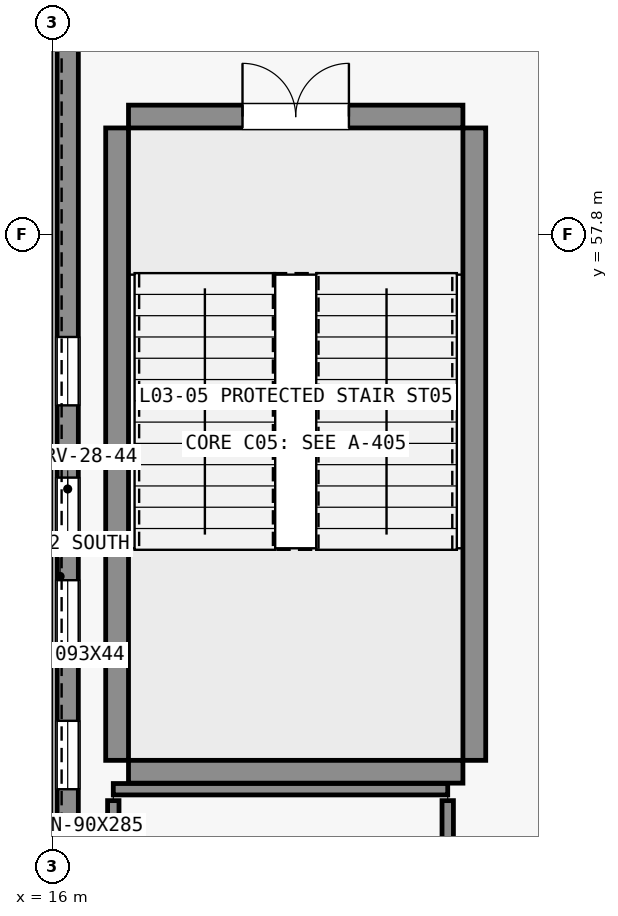
"""IFC4 building model, lengths in metres.
Left out: names, types, materials, properties, quantities, classifications, styles, units other than length and angle.
Written with IfcOpenShell. Run it as: python <this file> out.ifc"""

import sys

from ifc_helpers import new_model, si_unit, direction, frame, frame_2d, origin, place, context, subcontext, project, spatial, rectangle, extrude, element, fill, save


model = new_model("IFC4")
c1 = context("Model", 3, precision=1e-05, world=origin(), true_north=direction((0.0, 1.0)))
c2 = subcontext(c1, "Body", "Model", "MODEL_VIEW")
j1 = project(units=[si_unit("LENGTHUNIT", "METRE"), si_unit("PLANEANGLEUNIT", "RADIAN")], contexts=[c1])
p1 = place(None, origin())
s1 = spatial("IfcSite", under=j1, at=p1, CompositionType="ELEMENT")
p2 = place(p1, origin())
s2 = spatial("IfcBuilding", under=s1, at=p2, CompositionType="ELEMENT")
p3 = place(p2, frame((0.0, 0.0, 16.2)))
s3 = spatial("IfcBuildingStorey", under=s2, at=p3, CompositionType="ELEMENT", Elevation=16.2)
p4 = place(p3, frame((17.0, 50.73, 0.0), z_axis=(0.0, 0.0, 1.0), x_axis=(1.0, 0.0, 0.0)))
e1 = element("IfcWall", 1, at=p4, inside=s3, PredefinedType="SHEAR", context=c2, shape_type="SweptSolid", body=[
    extrude(rectangle(XDim=4.4, YDim=0.3, at=frame_2d((2.2, 0.0))), origin(), (0.0, 0.0, 1.0), 4.8),
])
p5 = place(p3, frame((17.0, 59.35, 0.0), z_axis=(0.0, 0.0, 1.0), x_axis=(1.0, 0.0, 0.0)))
e2 = element("IfcWall", 2, at=p5, inside=s3, PredefinedType="SHEAR", context=c2, shape_type="SweptSolid", body=[
    extrude(rectangle(XDim=4.4, YDim=0.3, at=frame_2d((2.2, 0.0))), origin(), (0.0, 0.0, 1.0), 4.8),
])
p6 = place(p5, frame((1.5, 0.0, 0.0)))
e3 = element("IfcOpeningElement", 3, at=p6, cuts=e2, PredefinedType="OPENING", context=c2, shape_type="SweptSolid", body=[
    extrude(rectangle(XDim=1.4, YDim=2.2, at=frame_2d((0.7, 1.1))), frame((0.0, 0.16, 0.0), z_axis=(0.0, -1.0, 0.0), x_axis=(1.0, 0.0, 0.0)), (0.0, 0.0, 1.0), 0.32),
])
for number, where, z_axis, x_axis in (
    (4, (16.85, 50.88, 0.0), (0.0, 0.0, 1.0), (0.0, 1.0, 0.0)),
    (5, (21.55, 50.88, 0.0), (0.0, 0.0, 1.0), (0.0, 1.0, 0.0)),
):
    element("IfcWall", number, at=place(p3, frame(where, z_axis=z_axis, x_axis=x_axis)), inside=s3, PredefinedType="SHEAR", context=c2, shape_type="SweptSolid", body=[
        extrude(rectangle(XDim=8.32, YDim=0.3, at=frame_2d((4.16, 0.0))), origin(), (0.0, 0.0, 1.0), 4.8),
    ])
p7 = place(p3, frame((16.2, 48.05, 0.0), z_axis=(0.0, 0.0, 1.0), x_axis=(0.0, 1.0, 0.0)))
e6 = element("IfcWall", 6, at=p7, inside=s3, PredefinedType="STANDARD", context=c2, shape_type="SweptSolid", body=[
    extrude(rectangle(XDim=12.8, YDim=0.28, at=frame_2d((6.4, 0.0))), origin(), (0.0, 0.0, 1.0), 4.44),
])
p8 = place(p7, frame((1.1, 0.0, 0.95)))
e7 = element("IfcOpeningElement", 7, at=p8, cuts=e6, PredefinedType="OPENING", context=c2, shape_type="SweptSolid", body=[
    extrude(rectangle(XDim=0.9, YDim=2.85, at=frame_2d((0.45, 1.425))), frame((0.0, 0.15, 0.0), z_axis=(0.0, -1.0, 0.0), x_axis=(1.0, 0.0, 0.0)), (0.0, 0.0, 1.0), 0.3),
])
p9 = place(p7, frame((2.45, 0.0, 0.95)))
e8 = element("IfcOpeningElement", 8, at=p9, cuts=e6, PredefinedType="OPENING", context=c2, shape_type="SweptSolid", body=[
    extrude(rectangle(XDim=0.9, YDim=2.85, at=frame_2d((0.45, 1.425))), frame((0.0, 0.15, 0.0), z_axis=(0.0, -1.0, 0.0), x_axis=(1.0, 0.0, 0.0)), (0.0, 0.0, 1.0), 0.3),
])
p10 = place(p7, frame((4.3, 0.0, 0.95)))
e9 = element("IfcOpeningElement", 9, at=p10, cuts=e6, PredefinedType="OPENING", context=c2, shape_type="SweptSolid", body=[
    extrude(rectangle(XDim=0.9, YDim=2.85, at=frame_2d((0.45, 1.425))), frame((0.0, 0.15, 0.0), z_axis=(0.0, -1.0, 0.0), x_axis=(1.0, 0.0, 0.0)), (0.0, 0.0, 1.0), 0.3),
])
p11 = place(p7, frame((5.65, 0.0, 0.95)))
e10 = element("IfcOpeningElement", 10, at=p11, cuts=e6, PredefinedType="OPENING", context=c2, shape_type="SweptSolid", body=[
    extrude(rectangle(XDim=0.9, YDim=2.85, at=frame_2d((0.45, 1.425))), frame((0.0, 0.15, 0.0), z_axis=(0.0, -1.0, 0.0), x_axis=(1.0, 0.0, 0.0)), (0.0, 0.0, 1.0), 0.3),
])
p12 = place(p7, frame((7.5, 0.0, 0.95)))
e11 = element("IfcOpeningElement", 11, at=p12, cuts=e6, PredefinedType="OPENING", context=c2, shape_type="SweptSolid", body=[
    extrude(rectangle(XDim=0.9, YDim=2.85, at=frame_2d((0.45, 1.425))), frame((0.0, 0.15, 0.0), z_axis=(0.0, -1.0, 0.0), x_axis=(1.0, 0.0, 0.0)), (0.0, 0.0, 1.0), 0.3),
])
p13 = place(p3, frame((16.8, 50.5, 0.0), z_axis=(0.0, 0.0, 1.0), x_axis=(1.0, 0.0, 0.0)))
e12 = element("IfcWall", 12, at=p13, inside=s3, PredefinedType="STANDARD", context=c2, shape_type="SweptSolid", body=[
    extrude(rectangle(XDim=4.4, YDim=0.15, at=frame_2d((2.2, 0.0))), origin(), (0.0, 0.0, 1.0), 4.44),
])
p14 = place(p3, frame((16.8, 43.15, 0.0), z_axis=(0.0, 0.0, 1.0), x_axis=(0.0, 1.0, 0.0)))
e13 = element("IfcWall", 13, at=p14, inside=s3, PredefinedType="STANDARD", context=c2, shape_type="SweptSolid", body=[
    extrude(rectangle(XDim=7.2, YDim=0.15, at=frame_2d((3.6, 0.0))), origin(), (0.0, 0.0, 1.0), 4.44),
])
p15 = place(p3, frame((21.2, 43.15, 0.0), z_axis=(0.0, 0.0, 1.0), x_axis=(0.0, 1.0, 0.0)))
e14 = element("IfcWall", 14, at=p15, inside=s3, PredefinedType="STANDARD", context=c2, shape_type="SweptSolid", body=[
    extrude(rectangle(XDim=7.2, YDim=0.15, at=frame_2d((3.6, 0.0))), origin(), (0.0, 0.0, 1.0), 4.44),
])
p16 = place(p15, frame((3.1, 0.0, 0.0)))
e15 = element("IfcOpeningElement", 15, at=p16, cuts=e14, PredefinedType="OPENING", context=c2, shape_type="SweptSolid", body=[
    extrude(rectangle(XDim=1.0, YDim=2.15, at=frame_2d((0.5, 1.075))), frame((0.0, 0.085, 0.0), z_axis=(0.0, -1.0, 0.0), x_axis=(1.0, 0.0, 0.0)), (0.0, 0.0, 1.0), 0.17),
])
p17 = place(p8, origin())
e16 = element("IfcWindow", 16, at=p17, inside=s3, PartitioningType="DOUBLE_PANEL_VERTICAL", PredefinedType="WINDOW", context=c2, shape_type="SweptSolid", body=[
    extrude(rectangle(XDim=0.9, YDim=2.85, at=frame_2d((0.45, 1.425))), frame((0.0, 0.03, 0.0), z_axis=(0.0, -1.0, 0.0), x_axis=(1.0, 0.0, 0.0)), (0.0, 0.0, 1.0), 0.06),
])
fill(e7, e16)
p18 = place(p9, origin())
e17 = element("IfcWindow", 17, at=p18, inside=s3, PartitioningType="DOUBLE_PANEL_VERTICAL", PredefinedType="WINDOW", context=c2, shape_type="SweptSolid", body=[
    extrude(rectangle(XDim=0.9, YDim=2.85, at=frame_2d((0.45, 1.425))), frame((0.0, 0.03, 0.0), z_axis=(0.0, -1.0, 0.0), x_axis=(1.0, 0.0, 0.0)), (0.0, 0.0, 1.0), 0.06),
])
fill(e8, e17)
p19 = place(p10, origin())
e18 = element("IfcWindow", 18, at=p19, inside=s3, PartitioningType="DOUBLE_PANEL_VERTICAL", PredefinedType="WINDOW", context=c2, shape_type="SweptSolid", body=[
    extrude(rectangle(XDim=0.9, YDim=2.85, at=frame_2d((0.45, 1.425))), frame((0.0, 0.03, 0.0), z_axis=(0.0, -1.0, 0.0), x_axis=(1.0, 0.0, 0.0)), (0.0, 0.0, 1.0), 0.06),
])
fill(e9, e18)
p20 = place(p11, origin())
e19 = element("IfcWindow", 19, at=p20, inside=s3, PartitioningType="DOUBLE_PANEL_VERTICAL", PredefinedType="WINDOW", context=c2, shape_type="SweptSolid", body=[
    extrude(rectangle(XDim=0.9, YDim=2.85, at=frame_2d((0.45, 1.425))), frame((0.0, 0.03, 0.0), z_axis=(0.0, -1.0, 0.0), x_axis=(1.0, 0.0, 0.0)), (0.0, 0.0, 1.0), 0.06),
])
fill(e10, e19)
p21 = place(p12, origin())
e20 = element("IfcWindow", 20, at=p21, inside=s3, PartitioningType="DOUBLE_PANEL_VERTICAL", PredefinedType="WINDOW", context=c2, shape_type="SweptSolid", body=[
    extrude(rectangle(XDim=0.9, YDim=2.85, at=frame_2d((0.45, 1.425))), frame((0.0, 0.03, 0.0), z_axis=(0.0, -1.0, 0.0), x_axis=(1.0, 0.0, 0.0)), (0.0, 0.0, 1.0), 0.06),
])
fill(e11, e20)
p22 = place(p6, origin())
e21 = element("IfcDoor", 21, at=p22, inside=s3, OperationType="DOUBLE_DOOR_SINGLE_SWING", PredefinedType="DOOR", context=c2, shape_type="SweptSolid", body=[
    extrude(rectangle(XDim=1.4, YDim=2.2, at=frame_2d((0.7, 1.1))), frame((0.0, 0.025, 0.0), z_axis=(0.0, -1.0, 0.0), x_axis=(1.0, 0.0, 0.0)), (0.0, 0.0, 1.0), 0.05),
])
fill(e3, e21)
save(model, sys.argv[1])
